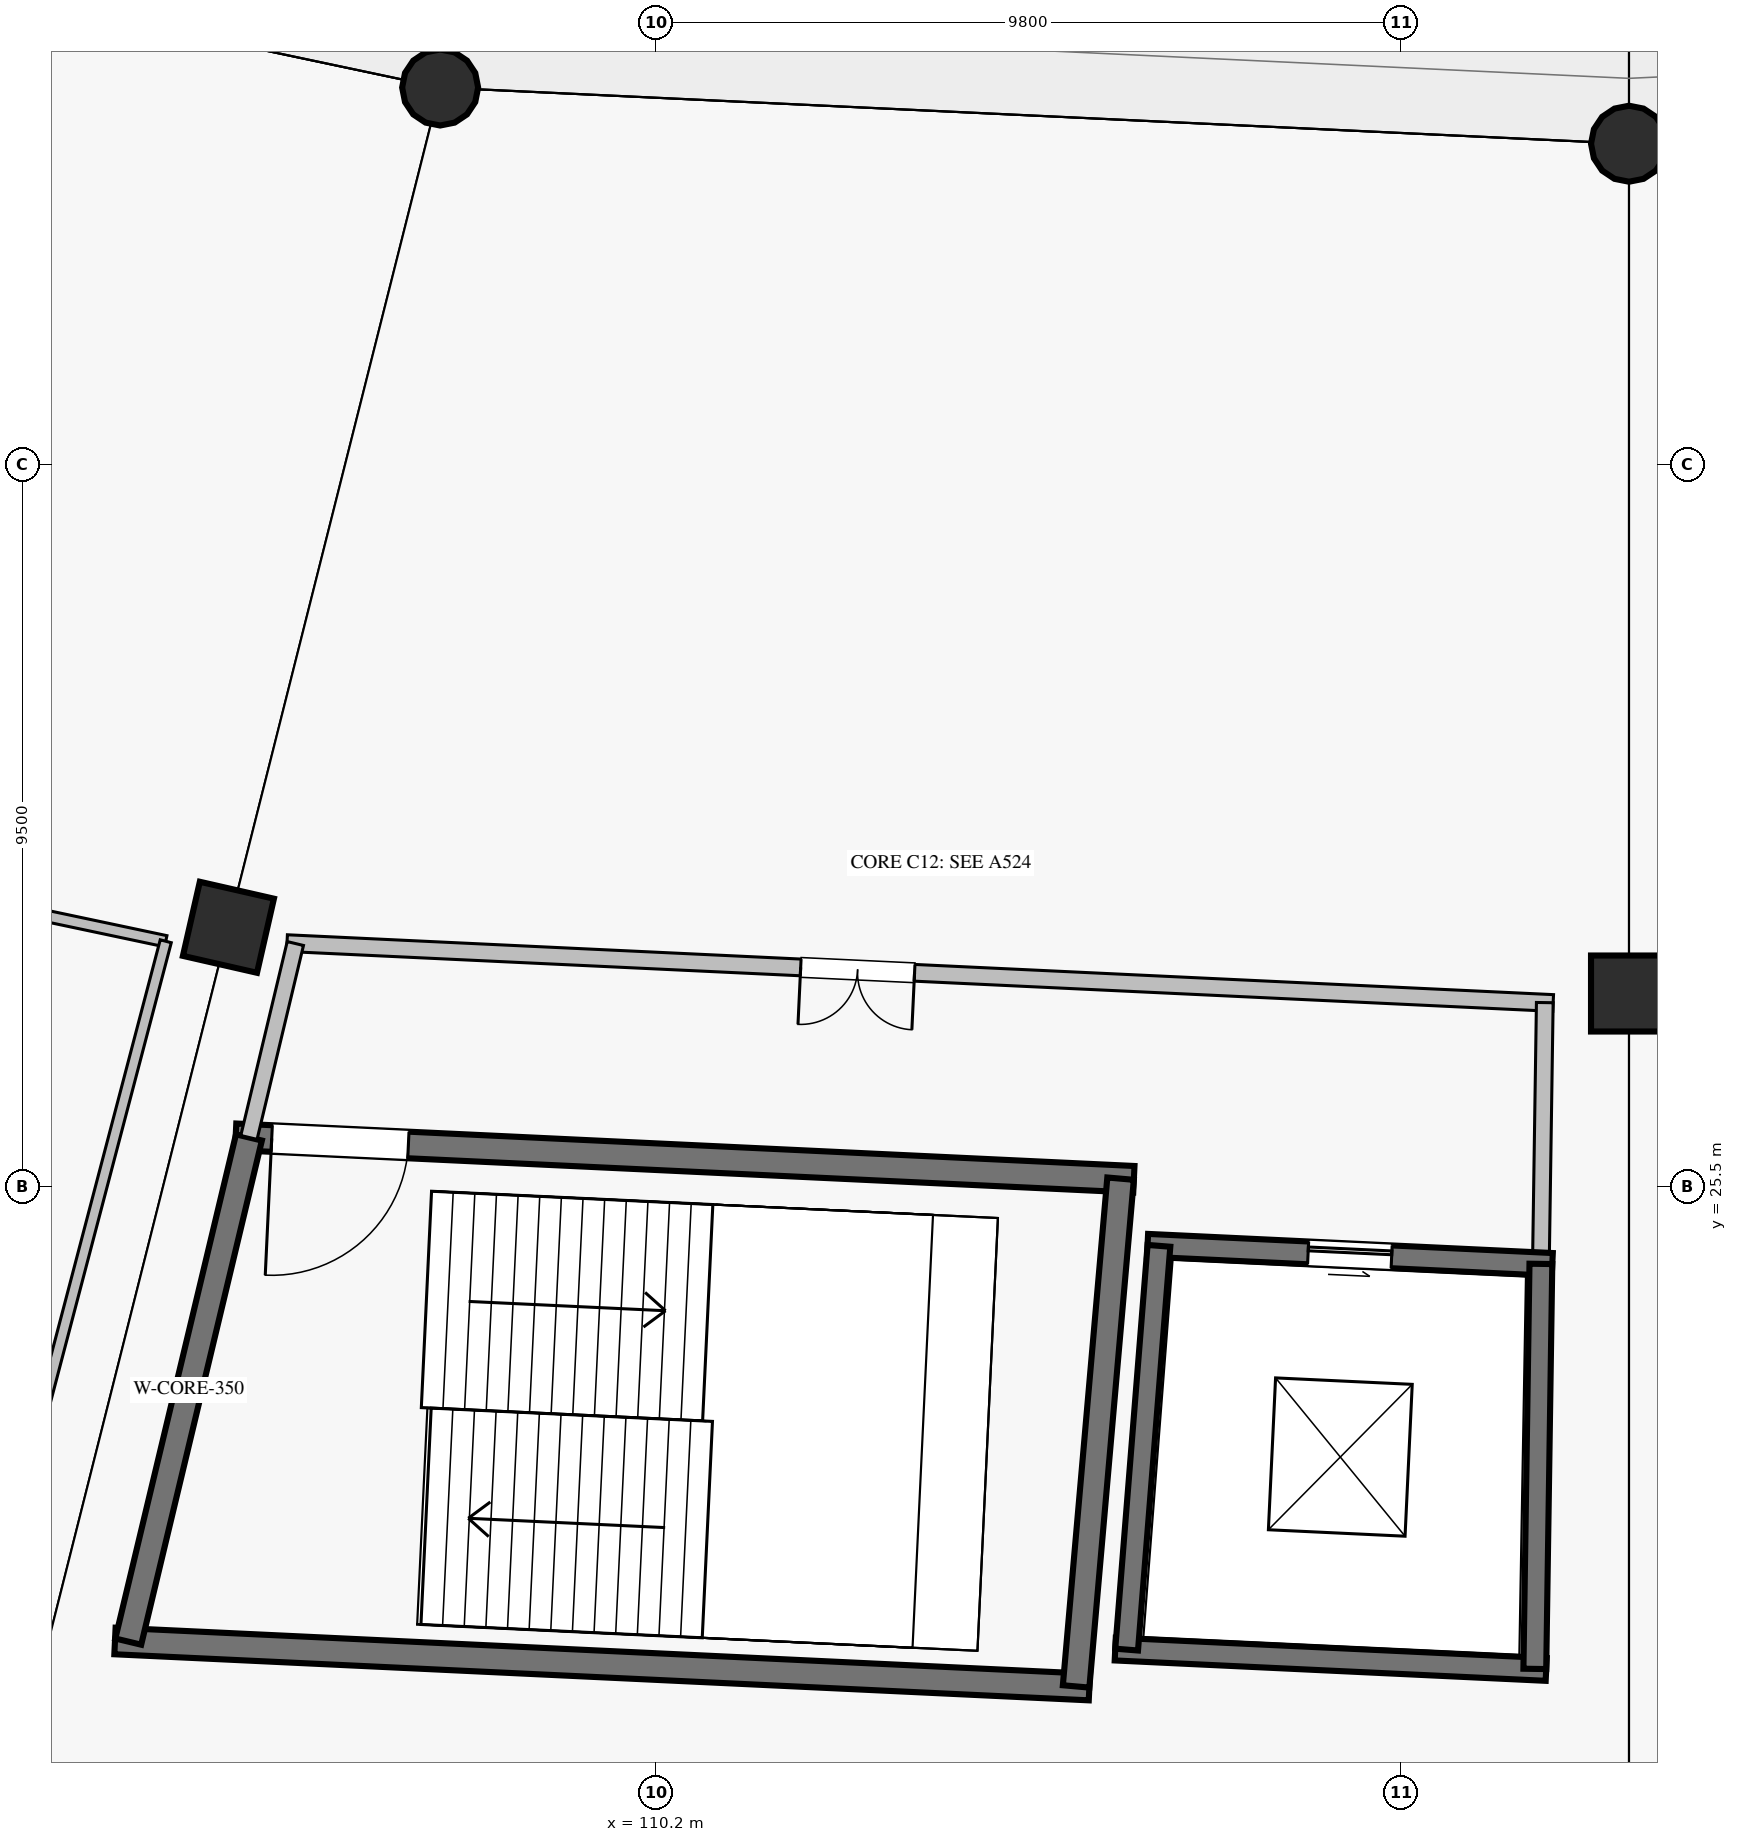
"""IFC4 building model, lengths in metres.
Left out: names, types, materials, properties, quantities, classifications, styles, units other than length and angle.
Written with IfcOpenShell. Run it as: python <this file> out.ifc"""

import sys

from ifc_helpers import new_model, si_unit, direction, frame, frame_2d, origin, origin_2d, place, context, subcontext, project, spatial, rectangle, circle, extrude, element, fill, save


model = new_model("IFC4")
c1 = context("Model", 3, precision=1e-05, world=origin(), true_north=direction((0.0, 1.0)))
c2 = subcontext(c1, "Body", "Model", "MODEL_VIEW")
j1 = project(units=[si_unit("LENGTHUNIT", "METRE"), si_unit("PLANEANGLEUNIT", "RADIAN")], contexts=[c1])
p1 = place(None, origin())
s1 = spatial("IfcSite", under=j1, at=p1, CompositionType="ELEMENT")
p2 = place(p1, origin())
s2 = spatial("IfcBuilding", under=s1, at=p2, CompositionType="ELEMENT")
p3 = place(p2, frame((0.0, 0.0, 5.78)))
s3 = spatial("IfcBuildingStorey", under=s2, at=p3, CompositionType="ELEMENT", Elevation=5.78)
for number, where, z_axis, x_axis in (
    (1, (107.358, 39.96, 0.0), (0.0, 0.0, 1.0), (-0.223, -0.975, 0.0)),
    (2, (123.0, 39.22, 0.0), (0.0, 0.0, 1.0), (0.0, -1.0, 0.0)),
):
    element("IfcColumn", number, at=place(p3, frame(where, z_axis=z_axis, x_axis=x_axis)), inside=s3, PredefinedType="COLUMN", context=c2, shape_type="SweptSolid", body=[
        extrude(circle(Radius=0.5, at=origin_2d()), origin(), (0.0, 0.0, 1.0), 4.76),
    ])
for number, where, z_axis, x_axis in (
    (3, (104.572, 28.911, 0.0), (0.0, 0.0, 1.0), (-0.223, -0.975, 0.0)),
    (4, (123.0, 28.04, 0.0), (0.0, 0.0, 1.0), (0.0, -1.0, 0.0)),
):
    element("IfcColumn", number, at=place(p3, frame(where, z_axis=z_axis, x_axis=x_axis)), inside=s3, PredefinedType="COLUMN", context=c2, shape_type="SweptSolid", body=[
        extrude(rectangle(XDim=1.0, YDim=1.0, at=origin_2d()), origin(), (0.0, 0.0, 1.0), 4.76),
    ])
p4 = place(p3, frame((104.667, 26.155, 0.0), z_axis=(0.0, 0.0, 1.0), x_axis=(0.998883770468, -0.04723571843, 0.0)))
e5 = element("IfcWall", 5, at=p4, inside=s3, PredefinedType="SHEAR", context=c2, shape_type="SweptSolid", body=[
    extrude(rectangle(XDim=11.831, YDim=0.35, at=frame_2d((5.916, 0.0))), origin(), (0.0, 0.0, 1.0), 4.5),
])
p5 = place(p4, frame((0.475, 0.0, 0.0)))
e6 = element("IfcOpeningElement", 6, at=p5, cuts=e5, PredefinedType="OPENING", context=c2, shape_type="SweptSolid", body=[
    extrude(rectangle(XDim=1.8, YDim=2.2, at=frame_2d((0.9, 1.1))), frame((0.0, 0.185, 0.0), z_axis=(0.0, -1.0, 0.0), x_axis=(1.0, 0.0, 0.0)), (0.0, 0.0, 1.0), 0.37),
])
p6 = place(p3, frame((103.08, 19.522, 0.0), z_axis=(0.0, 0.0, 1.0), x_axis=(0.998884004857, -0.047230761603, 0.0)))
e7 = element("IfcWall", 7, at=p6, inside=s3, PredefinedType="SHEAR", context=c2, shape_type="SweptSolid", body=[
    extrude(rectangle(XDim=12.835, YDim=0.35, at=frame_2d((6.417, 0.0))), origin(), (0.0, 0.0, 1.0), 4.5),
])
p7 = place(p3, frame((104.842, 26.146, 0.0), z_axis=(0.0, 0.0, 1.0), x_axis=(-0.232820532896, -0.972519716747, 0.0)))
e8 = element("IfcWall", 8, at=p7, inside=s3, PredefinedType="SHEAR", context=c2, shape_type="SweptSolid", body=[
    extrude(rectangle(XDim=6.82, YDim=0.35, at=frame_2d((3.41, 0.0))), origin(), (0.0, 0.0, 1.0), 4.5),
])
p8 = place(p3, frame((116.31, 25.604, 0.0), z_axis=(0.0, 0.0, 1.0), x_axis=(-0.087232889326, -0.996187945631, 0.0)))
e9 = element("IfcWall", 9, at=p8, inside=s3, PredefinedType="SHEAR", context=c2, shape_type="SweptSolid", body=[
    extrude(rectangle(XDim=6.706, YDim=0.35, at=frame_2d((3.353, 0.0))), origin(), (0.0, 0.0, 1.0), 4.5),
])
p9 = place(p3, frame((116.665, 24.728, 0.0), z_axis=(0.0, 0.0, 1.0), x_axis=(0.998882494219, -0.047262699282, 0.0)))
e10 = element("IfcWall", 10, at=p9, inside=s3, PredefinedType="SHEAR", context=c2, shape_type="SweptSolid", body=[
    extrude(rectangle(XDim=5.331, YDim=0.3, at=frame_2d((2.666, 0.0))), origin(), (0.0, 0.0, 1.0), 4.5),
])
p10 = place(p9, frame((2.115, 0.0, 0.0)))
e11 = element("IfcOpeningElement", 11, at=p10, cuts=e10, PredefinedType="OPENING", context=c2, shape_type="SweptSolid", body=[
    extrude(rectangle(XDim=1.1, YDim=2.2, at=frame_2d((0.55, 1.1))), frame((0.0, 0.16, 0.0), z_axis=(0.0, -1.0, 0.0), x_axis=(1.0, 0.0, 0.0)), (0.0, 0.0, 1.0), 0.32),
])
p11 = place(p3, frame((116.24, 19.416, 0.0), z_axis=(0.0, 0.0, 1.0), x_axis=(0.998884329444, -0.047223896393, 0.0)))
e12 = element("IfcWall", 12, at=p11, inside=s3, PredefinedType="SHEAR", context=c2, shape_type="SweptSolid", body=[
    extrude(rectangle(XDim=5.677, YDim=0.3, at=frame_2d((2.838, 0.0))), origin(), (0.0, 0.0, 1.0), 4.5),
])
p12 = place(p3, frame((116.815, 24.72, 0.0), z_axis=(0.0, 0.0, 1.0), x_axis=(-0.079807132276, -0.996810323802, 0.0)))
e13 = element("IfcWall", 13, at=p12, inside=s3, PredefinedType="SHEAR", context=c2, shape_type="SweptSolid", body=[
    extrude(rectangle(XDim=5.329, YDim=0.3, at=frame_2d((2.665, 0.0))), origin(), (0.0, 0.0, 1.0), 4.5),
])
p13 = place(p3, frame((121.84, 24.483, 0.0), z_axis=(0.0, 0.0, 1.0), x_axis=(-0.014935332807, -0.999888461697, 0.0)))
e14 = element("IfcWall", 14, at=p13, inside=s3, PredefinedType="SHEAR", context=c2, shape_type="SweptSolid", body=[
    extrude(rectangle(XDim=5.329, YDim=0.3, at=frame_2d((2.665, 0.0))), origin(), (0.0, 0.0, 1.0), 4.5),
])
p14 = place(p3, frame((105.343, 28.703, 0.0), z_axis=(0.0, 0.0, 1.0), x_axis=(0.998884242682, -0.047225731555, 0.0)))
e15 = element("IfcWall", 15, at=p14, inside=s3, PredefinedType="SOLIDWALL", context=c2, shape_type="SweptSolid", body=[
    extrude(rectangle(XDim=16.677, YDim=0.22, at=frame_2d((8.339, 0.0))), origin(), (0.0, 0.0, 1.0), 3.448),
])
p15 = place(p14, frame((6.766, 0.0, 0.0)))
e16 = element("IfcOpeningElement", 16, at=p15, cuts=e15, PredefinedType="OPENING", context=c2, shape_type="SweptSolid", body=[
    extrude(rectangle(XDim=1.5, YDim=2.2, at=frame_2d((0.75, 1.1))), frame((0.0, 0.12, 0.0), z_axis=(0.0, -1.0, 0.0), x_axis=(1.0, 0.0, 0.0)), (0.0, 0.0, 1.0), 0.24),
])
p16 = place(p3, frame((105.453, 28.698, 0.0), z_axis=(0.0, 0.0, 1.0), x_axis=(-0.232756927197, -0.972534941707, 0.0)))
e17 = element("IfcWall", 17, at=p16, inside=s3, PredefinedType="SOLIDWALL", context=c2, shape_type="SweptSolid", body=[
    extrude(rectangle(XDim=2.623, YDim=0.22, at=frame_2d((1.312, 0.0))), origin(), (0.0, 0.0, 1.0), 4.5),
])
p17 = place(p3, frame((121.892, 27.92, 0.0), z_axis=(0.0, 0.0, 1.0), x_axis=(-0.014984113027, -0.999887731876, 0.0)))
e18 = element("IfcWall", 18, at=p17, inside=s3, PredefinedType="SOLIDWALL", context=c2, shape_type="SweptSolid", body=[
    extrude(rectangle(XDim=3.438, YDim=0.22, at=frame_2d((1.719, 0.0))), origin(), (0.0, 0.0, 1.0), 4.5),
])
p18 = place(p3, frame((86.756, 32.323, 0.0), z_axis=(0.0, 0.0, 1.0), x_axis=(0.978347075804, -0.206971010692, 0.0)))
e19 = element("IfcWall", 19, at=p18, inside=s3, PredefinedType="PARTITIONING", context=c2, shape_type="SweptSolid", body=[
    extrude(rectangle(XDim=17.368, YDim=0.15, at=frame_2d((8.684, 0.0))), origin(), (0.0, 0.0, 1.0), 3.82),
])
p19 = place(p18, frame((8.209, 0.0, 0.0)))
e20 = element("IfcOpeningElement", 20, at=p19, cuts=e19, PredefinedType="OPENING", context=c2, shape_type="SweptSolid", body=[
    extrude(rectangle(XDim=0.95, YDim=2.15, at=frame_2d((0.475, 1.075))), frame((0.0, 0.085, 0.0), z_axis=(0.0, -1.0, 0.0), x_axis=(1.0, 0.0, 0.0)), (0.0, 0.0, 1.0), 0.17),
])
p20 = place(p3, frame((103.748, 28.728, 0.0), z_axis=(0.0, 0.0, 1.0), x_axis=(-0.254131382846, -0.967169706025, 0.0)))
e21 = element("IfcWall", 21, at=p20, inside=s3, PredefinedType="PARTITIONING", context=c2, shape_type="SweptSolid", body=[
    extrude(rectangle(XDim=11.224, YDim=0.15, at=frame_2d((5.612, 0.0))), origin(), (0.0, 0.0, 1.0), 3.82),
])
p21 = place(p5, frame((1.8, 0.0, 0.0), z_axis=(0.0, 0.0, 1.0), x_axis=(-1.0, 0.0, 0.0)))
e22 = element("IfcDoor", 22, at=p21, inside=s3, OperationType="SINGLE_SWING_RIGHT", PredefinedType="DOOR", context=c2, shape_type="SweptSolid", body=[
    extrude(rectangle(XDim=1.8, YDim=2.2, at=frame_2d((0.9, 1.1))), frame((0.0, 0.025, 0.0), z_axis=(0.0, -1.0, 0.0), x_axis=(1.0, 0.0, 0.0)), (0.0, 0.0, 1.0), 0.05),
])
fill(e6, e22)
p22 = place(p10, origin())
e23 = element("IfcDoor", 23, at=p22, inside=s3, OperationType="SLIDING_TO_RIGHT", PredefinedType="DOOR", context=c2, shape_type="SweptSolid", body=[
    extrude(rectangle(XDim=1.1, YDim=2.2, at=frame_2d((0.55, 1.1))), frame((0.0, 0.025, 0.0), z_axis=(0.0, -1.0, 0.0), x_axis=(1.0, 0.0, 0.0)), (0.0, 0.0, 1.0), 0.05),
])
fill(e11, e23)
p23 = place(p15, frame((1.5, 0.0, 0.0), z_axis=(0.0, 0.0, 1.0), x_axis=(-1.0, 0.0, 0.0)))
e24 = element("IfcDoor", 24, at=p23, inside=s3, OperationType="DOUBLE_DOOR_SINGLE_SWING", PredefinedType="DOOR", context=c2, shape_type="SweptSolid", body=[
    extrude(rectangle(XDim=1.5, YDim=2.2, at=frame_2d((0.75, 1.1))), frame((0.0, 0.025, 0.0), z_axis=(0.0, -1.0, 0.0), x_axis=(1.0, 0.0, 0.0)), (0.0, 0.0, 1.0), 0.05),
])
fill(e16, e24)
save(model, sys.argv[1])
